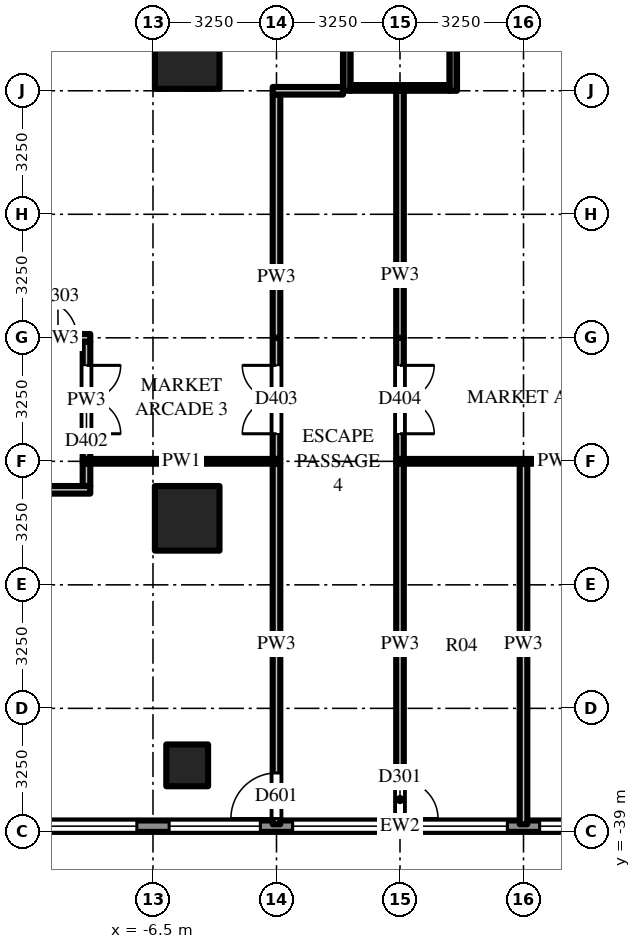
"""IFC4 building model, lengths in metres.
Left out: names, types, materials, properties, quantities, classifications, styles, units other than length and angle.
Written with IfcOpenShell. Run it as: python <this file> out.ifc"""

import sys

from ifc_helpers import new_model, si_unit, direction, frame, frame_2d, origin, origin_2d, place, context, subcontext, project, spatial, rectangle, extrude, source, transform, mapped, element, fill, save


model = new_model("IFC4")
c1 = context("Model", 3, precision=1e-05, world=origin(), true_north=direction((0.0, 1.0)))
c2 = subcontext(c1, "Body", "Model", "MODEL_VIEW")
j1 = project(units=[si_unit("LENGTHUNIT", "METRE"), si_unit("PLANEANGLEUNIT", "RADIAN")], contexts=[c1])
p1 = place(None, origin())
s1 = spatial("IfcSite", under=j1, at=p1, CompositionType="ELEMENT")
p2 = place(p1, origin())
s2 = spatial("IfcBuilding", under=s1, at=p2, CompositionType="ELEMENT")
p3 = place(p2, frame((0.0, 0.0, 14.0)))
s3 = spatial("IfcBuildingStorey", under=s2, at=p3, CompositionType="ELEMENT", Elevation=14.0)
m1 = source(origin(), c2, "Body", "SweptSolid", [
    extrude(rectangle(XDim=1.7, YDim=1.7, at=origin_2d()), origin(), (0.0, 0.0, 1.0), 5.0),
])
for number, where, z_axis, x_axis in (
    (1, (-5.6, -18.6, 0.0), (0.0, 0.0, 1.0), (1.0, 0.0, 0.0)),
    (2, (-5.6, -30.75, 0.0), (0.0, 0.0, 1.0), (1.0, 0.0, 0.0)),
):
    element("IfcColumn", number, at=place(p3, frame(where, z_axis=z_axis, x_axis=x_axis)), inside=s3, PredefinedType="COLUMN", context=c2, shape_type="MappedRepresentation", body=[
        mapped(m1, transform((0.0, 0.0, 0.0))),
    ])
m2 = source(origin(), c2, "Body", "SweptSolid", [
    extrude(rectangle(XDim=1.1, YDim=1.1, at=origin_2d()), origin(), (0.0, 0.0, 1.0), 5.0),
])
p4 = place(p3, frame((-5.6, -37.25, 0.0), z_axis=(0.0, 0.0, 1.0), x_axis=(1.0, 0.0, 0.0)))
e3 = element("IfcColumn", 3, at=p4, inside=s3, PredefinedType="COLUMN", context=c2, shape_type="MappedRepresentation", body=[
    mapped(m2, transform((0.0, 0.0, 0.0))),
])
m3 = source(origin(), c2, "Body", "SweptSolid", [
    extrude(rectangle(XDim=6.0, YDim=0.2, at=frame_2d((3.0, 0.0))), origin(), (0.0, 0.0, 1.0), 4.7),
])
for number, where, z_axis, x_axis in (
    (4, (1.4, -13.5, 0.0), (0.0, 0.0, 1.0), (0.0, -1.0, 0.0)),
    (5, (-1.4, -13.5, 0.0), (0.0, 0.0, 1.0), (0.0, -1.0, 0.0)),
):
    element("IfcWall", number, at=place(p3, frame(where, z_axis=z_axis, x_axis=x_axis)), inside=s3, PredefinedType="SHEAR", context=c2, shape_type="MappedRepresentation", body=[
        mapped(m3, transform((0.0, 0.0, 0.0))),
    ])
m4 = source(origin(), c2, "Body", "SweptSolid", [
    extrude(rectangle(XDim=2.6, YDim=0.15, at=frame_2d((1.3, 0.0))), origin(), (0.0, 0.0, 1.0), 4.7),
])
p5 = place(p3, frame((1.3, -19.425, 0.0), z_axis=(0.0, 0.0, 1.0), x_axis=(-1.0, 0.0, 0.0)))
e6 = element("IfcWall", 6, at=p5, inside=s3, PredefinedType="SHEAR", context=c2, shape_type="MappedRepresentation", body=[
    mapped(m4, transform((0.0, 0.0, 0.0))),
])
m5 = source(origin(), c2, "Body", "SweptSolid", [
    extrude(rectangle(XDim=71.5, YDim=0.3, at=frame_2d((35.75, 0.0))), origin(), (0.0, 0.0, 1.0), 4.7),
])
p6 = place(p3, frame((-35.75, -38.85, 0.0), z_axis=(0.0, 0.0, 1.0), x_axis=(1.0, 0.0, 0.0)))
e7 = element("IfcWall", 7, at=p6, inside=s3, PredefinedType="SOLIDWALL", context=c2, shape_type="MappedRepresentation", body=[
    mapped(m5, transform((0.0, 0.0, 0.0))),
])
m6 = source(origin(), c2, "Body", "SweptSolid", [
    extrude(rectangle(XDim=2.4, YDim=3.0, at=frame_2d((1.2, 1.5))), frame((0.0, 0.16, 0.0), z_axis=(0.0, -1.0, 0.0), x_axis=(1.0, 0.0, 0.0)), (0.0, 0.0, 1.0), 0.32),
])
p7 = place(p6, frame((0.425, 0.0, 0.9)))
e8 = element("IfcOpeningElement", 8, at=p7, cuts=e7, PredefinedType="OPENING", context=c2, shape_type="MappedRepresentation", body=[
    mapped(m6, transform((0.0, 0.0, 0.0))),
])
p8 = place(p6, frame((3.675, 0.0, 0.9)))
e9 = element("IfcOpeningElement", 9, at=p8, cuts=e7, PredefinedType="OPENING", context=c2, shape_type="MappedRepresentation", body=[
    mapped(m6, transform((0.0, 0.0, 0.0))),
])
p9 = place(p6, frame((6.925, 0.0, 0.9)))
e10 = element("IfcOpeningElement", 10, at=p9, cuts=e7, PredefinedType="OPENING", context=c2, shape_type="MappedRepresentation", body=[
    mapped(m6, transform((0.0, 0.0, 0.0))),
])
p10 = place(p6, frame((10.175, 0.0, 0.9)))
e11 = element("IfcOpeningElement", 11, at=p10, cuts=e7, PredefinedType="OPENING", context=c2, shape_type="MappedRepresentation", body=[
    mapped(m6, transform((0.0, 0.0, 0.0))),
])
p11 = place(p6, frame((13.425, 0.0, 0.9)))
e12 = element("IfcOpeningElement", 12, at=p11, cuts=e7, PredefinedType="OPENING", context=c2, shape_type="MappedRepresentation", body=[
    mapped(m6, transform((0.0, 0.0, 0.0))),
])
p12 = place(p6, frame((16.675, 0.0, 0.9)))
e13 = element("IfcOpeningElement", 13, at=p12, cuts=e7, PredefinedType="OPENING", context=c2, shape_type="MappedRepresentation", body=[
    mapped(m6, transform((0.0, 0.0, 0.0))),
])
p13 = place(p6, frame((19.925, 0.0, 0.9)))
e14 = element("IfcOpeningElement", 14, at=p13, cuts=e7, PredefinedType="OPENING", context=c2, shape_type="MappedRepresentation", body=[
    mapped(m6, transform((0.0, 0.0, 0.0))),
])
p14 = place(p6, frame((23.175, 0.0, 0.9)))
e15 = element("IfcOpeningElement", 15, at=p14, cuts=e7, PredefinedType="OPENING", context=c2, shape_type="MappedRepresentation", body=[
    mapped(m6, transform((0.0, 0.0, 0.0))),
])
p15 = place(p6, frame((26.425, 0.0, 0.9)))
e16 = element("IfcOpeningElement", 16, at=p15, cuts=e7, PredefinedType="OPENING", context=c2, shape_type="MappedRepresentation", body=[
    mapped(m6, transform((0.0, 0.0, 0.0))),
])
p16 = place(p6, frame((29.675, 0.0, 0.9)))
e17 = element("IfcOpeningElement", 17, at=p16, cuts=e7, PredefinedType="OPENING", context=c2, shape_type="MappedRepresentation", body=[
    mapped(m6, transform((0.0, 0.0, 0.0))),
])
p17 = place(p6, frame((32.925, 0.0, 0.9)))
e18 = element("IfcOpeningElement", 18, at=p17, cuts=e7, PredefinedType="OPENING", context=c2, shape_type="MappedRepresentation", body=[
    mapped(m6, transform((0.0, 0.0, 0.0))),
])
p18 = place(p6, frame((36.175, 0.0, 0.9)))
e19 = element("IfcOpeningElement", 19, at=p18, cuts=e7, PredefinedType="OPENING", context=c2, shape_type="MappedRepresentation", body=[
    mapped(m6, transform((0.0, 0.0, 0.0))),
])
p19 = place(p6, frame((39.425, 0.0, 0.9)))
e20 = element("IfcOpeningElement", 20, at=p19, cuts=e7, PredefinedType="OPENING", context=c2, shape_type="MappedRepresentation", body=[
    mapped(m6, transform((0.0, 0.0, 0.0))),
])
p20 = place(p6, frame((42.675, 0.0, 0.9)))
e21 = element("IfcOpeningElement", 21, at=p20, cuts=e7, PredefinedType="OPENING", context=c2, shape_type="MappedRepresentation", body=[
    mapped(m6, transform((0.0, 0.0, 0.0))),
])
p21 = place(p6, frame((45.925, 0.0, 0.9)))
e22 = element("IfcOpeningElement", 22, at=p21, cuts=e7, PredefinedType="OPENING", context=c2, shape_type="MappedRepresentation", body=[
    mapped(m6, transform((0.0, 0.0, 0.0))),
])
p22 = place(p6, frame((49.175, 0.0, 0.9)))
e23 = element("IfcOpeningElement", 23, at=p22, cuts=e7, PredefinedType="OPENING", context=c2, shape_type="MappedRepresentation", body=[
    mapped(m6, transform((0.0, 0.0, 0.0))),
])
p23 = place(p6, frame((52.425, 0.0, 0.9)))
e24 = element("IfcOpeningElement", 24, at=p23, cuts=e7, PredefinedType="OPENING", context=c2, shape_type="MappedRepresentation", body=[
    mapped(m6, transform((0.0, 0.0, 0.0))),
])
p24 = place(p6, frame((55.675, 0.0, 0.9)))
e25 = element("IfcOpeningElement", 25, at=p24, cuts=e7, PredefinedType="OPENING", context=c2, shape_type="MappedRepresentation", body=[
    mapped(m6, transform((0.0, 0.0, 0.0))),
])
p25 = place(p6, frame((58.925, 0.0, 0.9)))
e26 = element("IfcOpeningElement", 26, at=p25, cuts=e7, PredefinedType="OPENING", context=c2, shape_type="MappedRepresentation", body=[
    mapped(m6, transform((0.0, 0.0, 0.0))),
])
p26 = place(p6, frame((62.175, 0.0, 0.9)))
e27 = element("IfcOpeningElement", 27, at=p26, cuts=e7, PredefinedType="OPENING", context=c2, shape_type="MappedRepresentation", body=[
    mapped(m6, transform((0.0, 0.0, 0.0))),
])
p27 = place(p6, frame((65.425, 0.0, 0.9)))
e28 = element("IfcOpeningElement", 28, at=p27, cuts=e7, PredefinedType="OPENING", context=c2, shape_type="MappedRepresentation", body=[
    mapped(m6, transform((0.0, 0.0, 0.0))),
])
p28 = place(p6, frame((68.675, 0.0, 0.9)))
e29 = element("IfcOpeningElement", 29, at=p28, cuts=e7, PredefinedType="OPENING", context=c2, shape_type="MappedRepresentation", body=[
    mapped(m6, transform((0.0, 0.0, 0.0))),
])
m7 = source(origin(), c2, "Body", "SweptSolid", [
    extrude(rectangle(XDim=3.087, YDim=0.2, at=frame_2d((1.544, 0.0))), origin(), (0.0, 0.0, 1.0), 4.274),
])
p29 = place(p3, frame((-8.25, -26.1, 0.0), z_axis=(0.0, 0.0, 1.0), x_axis=(0.0, -1.0, 0.0)))
e30 = element("IfcWall", 30, at=p29, inside=s3, PredefinedType="PARTITIONING", context=c2, shape_type="MappedRepresentation", body=[
    mapped(m7, transform((0.0, 0.0, 0.0))),
])
m8 = source(origin(), c2, "Body", "SweptSolid", [
    extrude(rectangle(XDim=1.8, YDim=2.1, at=frame_2d((0.9, 1.05))), frame((0.0, 0.11, 0.0), z_axis=(0.0, -1.0, 0.0), x_axis=(1.0, 0.0, 0.0)), (0.0, 0.0, 1.0), 0.22),
])
p30 = place(p29, frame((0.625, 0.0, 0.0)))
e31 = element("IfcOpeningElement", 31, at=p30, cuts=e30, PredefinedType="OPENING", context=c2, shape_type="MappedRepresentation", body=[
    mapped(m8, transform((0.0, 0.0, 0.0))),
])
m9 = source(origin(), c2, "Body", "SweptSolid", [
    extrude(rectangle(XDim=0.587, YDim=0.2, at=frame_2d((0.294, 0.0))), origin(), (0.0, 0.0, 1.0), 4.7),
])
p31 = place(p3, frame((-8.25, -29.9, 0.0), z_axis=(0.0, 0.0, 1.0), x_axis=(0.0, 1.0, 0.0)))
e32 = element("IfcWall", 32, at=p31, inside=s3, PredefinedType="PARTITIONING", context=c2, shape_type="MappedRepresentation", body=[
    mapped(m9, transform((0.0, 0.0, 0.0))),
])
m10 = source(origin(), c2, "Body", "SweptSolid", [
    extrude(rectangle(XDim=3.188, YDim=0.2, at=frame_2d((1.594, 0.0))), origin(), (0.0, 0.0, 1.0), 4.7),
])
p32 = place(p3, frame((-3.25, -29.188, 0.0), z_axis=(0.0, 0.0, 1.0), x_axis=(0.0, 1.0, 0.0)))
e33 = element("IfcWall", 33, at=p32, inside=s3, PredefinedType="PARTITIONING", context=c2, shape_type="MappedRepresentation", body=[
    mapped(m10, transform((0.0, 0.0, 0.0))),
])
p33 = place(p32, frame((0.663, 0.0, 0.0)))
e34 = element("IfcOpeningElement", 34, at=p33, cuts=e33, PredefinedType="OPENING", context=c2, shape_type="MappedRepresentation", body=[
    mapped(m8, transform((0.0, 0.0, 0.0))),
])
m11 = source(origin(), c2, "Body", "SweptSolid", [
    extrude(rectangle(XDim=6.4, YDim=0.2, at=frame_2d((3.2, 0.0))), origin(), (0.0, 0.0, 1.0), 4.7),
])
p34 = place(p3, frame((-3.25, -19.6, 0.0), z_axis=(0.0, 0.0, 1.0), x_axis=(0.0, -1.0, 0.0)))
e35 = element("IfcWall", 35, at=p34, inside=s3, PredefinedType="PARTITIONING", context=c2, shape_type="MappedRepresentation", body=[
    mapped(m11, transform((0.0, 0.0, 0.0))),
])
m12 = source(origin(), c2, "Body", "SweptSolid", [
    extrude(rectangle(XDim=9.488, YDim=0.2, at=frame_2d((4.744, 0.0))), origin(), (0.0, 0.0, 1.0), 3.918),
])
p35 = place(p3, frame((-3.25, -38.8, 0.0), z_axis=(0.0, 0.0, 1.0), x_axis=(0.0, 1.0, 0.0)))
e36 = element("IfcWall", 36, at=p35, inside=s3, PredefinedType="PARTITIONING", context=c2, shape_type="MappedRepresentation", body=[
    mapped(m12, transform((0.0, 0.0, 0.0))),
])
m13 = source(origin(), c2, "Body", "SweptSolid", [
    extrude(rectangle(XDim=1.2, YDim=2.1, at=frame_2d((0.6, 1.05))), frame((0.0, 0.11, 0.0), z_axis=(0.0, -1.0, 0.0), x_axis=(1.0, 0.0, 0.0)), (0.0, 0.0, 1.0), 0.22),
])
p36 = place(p35, frame((0.15, 0.0, 0.0)))
e37 = element("IfcOpeningElement", 37, at=p36, cuts=e36, PredefinedType="OPENING", context=c2, shape_type="MappedRepresentation", body=[
    mapped(m13, transform((0.0, 0.0, 0.0))),
])
m14 = source(origin(), c2, "Body", "SweptSolid", [
    extrude(rectangle(XDim=3.188, YDim=0.2, at=frame_2d((1.594, 0.0))), origin(), (0.0, 0.0, 1.0), 3.996),
])
p37 = place(p3, frame((0.0, -26.0, 0.0), z_axis=(0.0, 0.0, 1.0), x_axis=(0.0, -1.0, 0.0)))
e38 = element("IfcWall", 38, at=p37, inside=s3, PredefinedType="PARTITIONING", context=c2, shape_type="MappedRepresentation", body=[
    mapped(m14, transform((0.0, 0.0, 0.0))),
])
p38 = place(p37, frame((0.725, 0.0, 0.0)))
e39 = element("IfcOpeningElement", 39, at=p38, cuts=e38, PredefinedType="OPENING", context=c2, shape_type="MappedRepresentation", body=[
    mapped(m8, transform((0.0, 0.0, 0.0))),
])
p39 = place(p3, frame((0.0, -29.312, 0.0), z_axis=(0.0, 0.0, 1.0), x_axis=(0.0, -1.0, 0.0)))
e40 = element("IfcWall", 40, at=p39, inside=s3, PredefinedType="PARTITIONING", context=c2, shape_type="MappedRepresentation", body=[
    mapped(m12, transform((0.0, 0.0, 0.0))),
])
m15 = source(origin(), c2, "Body", "SweptSolid", [
    extrude(rectangle(XDim=1.0, YDim=2.1, at=frame_2d((0.5, 1.05))), frame((0.0, 0.11, 0.0), z_axis=(0.0, -1.0, 0.0), x_axis=(1.0, 0.0, 0.0)), (0.0, 0.0, 1.0), 0.22),
])
p40 = place(p39, frame((8.337, 0.0, 0.0)))
e41 = element("IfcOpeningElement", 41, at=p40, cuts=e40, PredefinedType="OPENING", context=c2, shape_type="MappedRepresentation", body=[
    mapped(m15, transform((0.0, 0.0, 0.0))),
])
m16 = source(origin(), c2, "Body", "SweptSolid", [
    extrude(rectangle(XDim=6.5, YDim=0.2, at=frame_2d((3.25, 0.0))), origin(), (0.0, 0.0, 1.0), 3.996),
])
p41 = place(p3, frame((0.0, -19.5, 0.0), z_axis=(0.0, 0.0, 1.0), x_axis=(0.0, -1.0, 0.0)))
e42 = element("IfcWall", 42, at=p41, inside=s3, PredefinedType="PARTITIONING", context=c2, shape_type="MappedRepresentation", body=[
    mapped(m16, transform((0.0, 0.0, 0.0))),
])
p42 = place(p3, frame((3.25, -38.8, 0.0), z_axis=(0.0, 0.0, 1.0), x_axis=(0.0, 1.0, 0.0)))
e43 = element("IfcWall", 43, at=p42, inside=s3, PredefinedType="PARTITIONING", context=c2, shape_type="MappedRepresentation", body=[
    mapped(m12, transform((0.0, 0.0, 0.0))),
])
m17 = source(origin(), c2, "Body", "SweptSolid", [
    extrude(rectangle(XDim=8.2, YDim=0.2, at=frame_2d((4.1, 0.0))), origin(), (0.0, 0.0, 1.0), 4.7),
])
p43 = place(p3, frame((-8.15, -30.0, 0.0), z_axis=(0.0, 0.0, 1.0), x_axis=(-1.0, 0.0, 0.0)))
e44 = element("IfcWall", 44, at=p43, inside=s3, PredefinedType="PARTITIONING", context=c2, shape_type="MappedRepresentation", body=[
    mapped(m17, transform((0.0, 0.0, 0.0))),
])
p44 = place(p3, frame((-3.15, -29.25, 0.0), z_axis=(0.0, 0.0, 1.0), x_axis=(-1.0, 0.0, 0.0)))
e45 = element("IfcWall", 45, at=p44, inside=s3, PredefinedType="PARTITIONING", context=c2, shape_type="SweptSolid", body=[
    extrude(rectangle(XDim=5.2, YDim=0.125, at=frame_2d((2.6, 0.0))), origin(), (0.0, 0.0, 1.0), 3.918),
])
p45 = place(p3, frame((8.35, -29.25, 0.0), z_axis=(0.0, 0.0, 1.0), x_axis=(-1.0, 0.0, 0.0)))
e46 = element("IfcWall", 46, at=p45, inside=s3, PredefinedType="PARTITIONING", context=c2, shape_type="SweptSolid", body=[
    extrude(rectangle(XDim=8.45, YDim=0.125, at=frame_2d((4.225, 0.0))), origin(), (0.0, 0.0, 1.0), 3.918),
])
m18 = source(origin(), c2, "Body", "SweptSolid", [
    extrude(rectangle(XDim=1.6, YDim=0.2, at=frame_2d((0.8, 0.0))), origin(), (0.0, 0.0, 1.0), 4.7),
])
p46 = place(p3, frame((-9.75, -26.0, 0.0), z_axis=(0.0, 0.0, 1.0), x_axis=(1.0, 0.0, 0.0)))
e47 = element("IfcWall", 47, at=p46, inside=s3, PredefinedType="PARTITIONING", context=c2, shape_type="MappedRepresentation", body=[
    mapped(m18, transform((0.0, 0.0, 0.0))),
])
p47 = place(p46, frame((0.25, 0.0, 0.0)))
e48 = element("IfcOpeningElement", 48, at=p47, cuts=e47, PredefinedType="OPENING", context=c2, shape_type="MappedRepresentation", body=[
    mapped(m15, transform((0.0, 0.0, 0.0))),
])
m19 = source(origin(), c2, "Body", "SweptSolid", [
    extrude(rectangle(XDim=1.85, YDim=0.2, at=frame_2d((0.925, 0.0))), origin(), (0.0, 0.0, 1.0), 3.996),
])
p48 = place(p3, frame((-3.35, -19.5, 0.0), z_axis=(0.0, 0.0, 1.0), x_axis=(1.0, 0.0, 0.0)))
e49 = element("IfcWall", 49, at=p48, inside=s3, PredefinedType="PARTITIONING", context=c2, shape_type="MappedRepresentation", body=[
    mapped(m19, transform((0.0, 0.0, 0.0))),
])
m20 = source(origin(), c2, "Body", "SweptSolid", [
    extrude(rectangle(XDim=2.4, YDim=3.0, at=frame_2d((1.2, 1.5))), frame((0.0, 0.03, 0.0), z_axis=(0.0, -1.0, 0.0), x_axis=(1.0, 0.0, 0.0)), (0.0, 0.0, 1.0), 0.06),
])
p49 = place(p15, origin())
e50 = element("IfcWindow", 50, at=p49, inside=s3, PartitioningType="SINGLE_PANEL", PredefinedType="WINDOW", context=c2, shape_type="MappedRepresentation", body=[
    mapped(m20, transform((0.0, 0.0, 0.0))),
])
fill(e16, e50)
p50 = place(p16, origin())
e51 = element("IfcWindow", 51, at=p50, inside=s3, PartitioningType="SINGLE_PANEL", PredefinedType="WINDOW", context=c2, shape_type="MappedRepresentation", body=[
    mapped(m20, transform((0.0, 0.0, 0.0))),
])
fill(e17, e51)
p51 = place(p17, origin())
e52 = element("IfcWindow", 52, at=p51, inside=s3, PartitioningType="SINGLE_PANEL", PredefinedType="WINDOW", context=c2, shape_type="MappedRepresentation", body=[
    mapped(m20, transform((0.0, 0.0, 0.0))),
])
fill(e18, e52)
p52 = place(p18, origin())
e53 = element("IfcWindow", 53, at=p52, inside=s3, PartitioningType="SINGLE_PANEL", PredefinedType="WINDOW", context=c2, shape_type="MappedRepresentation", body=[
    mapped(m20, transform((0.0, 0.0, 0.0))),
])
fill(e19, e53)
p53 = place(p19, origin())
e54 = element("IfcWindow", 54, at=p53, inside=s3, PartitioningType="SINGLE_PANEL", PredefinedType="WINDOW", context=c2, shape_type="MappedRepresentation", body=[
    mapped(m20, transform((0.0, 0.0, 0.0))),
])
fill(e20, e54)
m21 = source(origin(), c2, "Body", "SweptSolid", [
    extrude(rectangle(XDim=1.0, YDim=2.1, at=frame_2d((0.5, 1.05))), frame((0.0, 0.025, 0.0), z_axis=(0.0, -1.0, 0.0), x_axis=(1.0, 0.0, 0.0)), (0.0, 0.0, 1.0), 0.05),
])
p54 = place(p40, origin())
e55 = element("IfcDoor", 55, at=p54, inside=s3, OperationType="SINGLE_SWING_RIGHT", PredefinedType="DOOR", context=c2, shape_type="MappedRepresentation", body=[
    mapped(m21, transform((0.0, 0.0, 0.0))),
])
fill(e41, e55)
m22 = source(origin(), c2, "Body", "SweptSolid", [
    extrude(rectangle(XDim=1.2, YDim=2.1, at=frame_2d((0.6, 1.05))), frame((0.0, 0.025, 0.0), z_axis=(0.0, -1.0, 0.0), x_axis=(1.0, 0.0, 0.0)), (0.0, 0.0, 1.0), 0.05),
])
p55 = place(p36, origin())
e56 = element("IfcDoor", 56, at=p55, inside=s3, OperationType="SINGLE_SWING_LEFT", PredefinedType="DOOR", context=c2, shape_type="MappedRepresentation", body=[
    mapped(m22, transform((0.0, 0.0, 0.0))),
])
fill(e37, e56)
m23 = source(origin(), c2, "Body", "SweptSolid", [
    extrude(rectangle(XDim=1.8, YDim=2.1, at=frame_2d((0.9, 1.05))), frame((0.0, 0.025, 0.0), z_axis=(0.0, -1.0, 0.0), x_axis=(1.0, 0.0, 0.0)), (0.0, 0.0, 1.0), 0.05),
])
p56 = place(p30, origin())
e57 = element("IfcDoor", 57, at=p56, inside=s3, OperationType="DOUBLE_DOOR_SINGLE_SWING", PredefinedType="DOOR", context=c2, shape_type="MappedRepresentation", body=[
    mapped(m23, transform((0.0, 0.0, 0.0))),
])
fill(e31, e57)
p57 = place(p33, origin())
e58 = element("IfcDoor", 58, at=p57, inside=s3, OperationType="DOUBLE_DOOR_SINGLE_SWING", PredefinedType="DOOR", context=c2, shape_type="MappedRepresentation", body=[
    mapped(m23, transform((0.0, 0.0, 0.0))),
])
fill(e34, e58)
p58 = place(p38, origin())
e59 = element("IfcDoor", 59, at=p58, inside=s3, OperationType="DOUBLE_DOOR_SINGLE_SWING", PredefinedType="DOOR", context=c2, shape_type="MappedRepresentation", body=[
    mapped(m23, transform((0.0, 0.0, 0.0))),
])
fill(e39, e59)
p59 = place(p47, origin())
e60 = element("IfcDoor", 60, at=p59, inside=s3, OperationType="SINGLE_SWING_LEFT", PredefinedType="DOOR", context=c2, shape_type="MappedRepresentation", body=[
    mapped(m21, transform((0.0, 0.0, 0.0))),
])
fill(e48, e60)
save(model, sys.argv[1])
